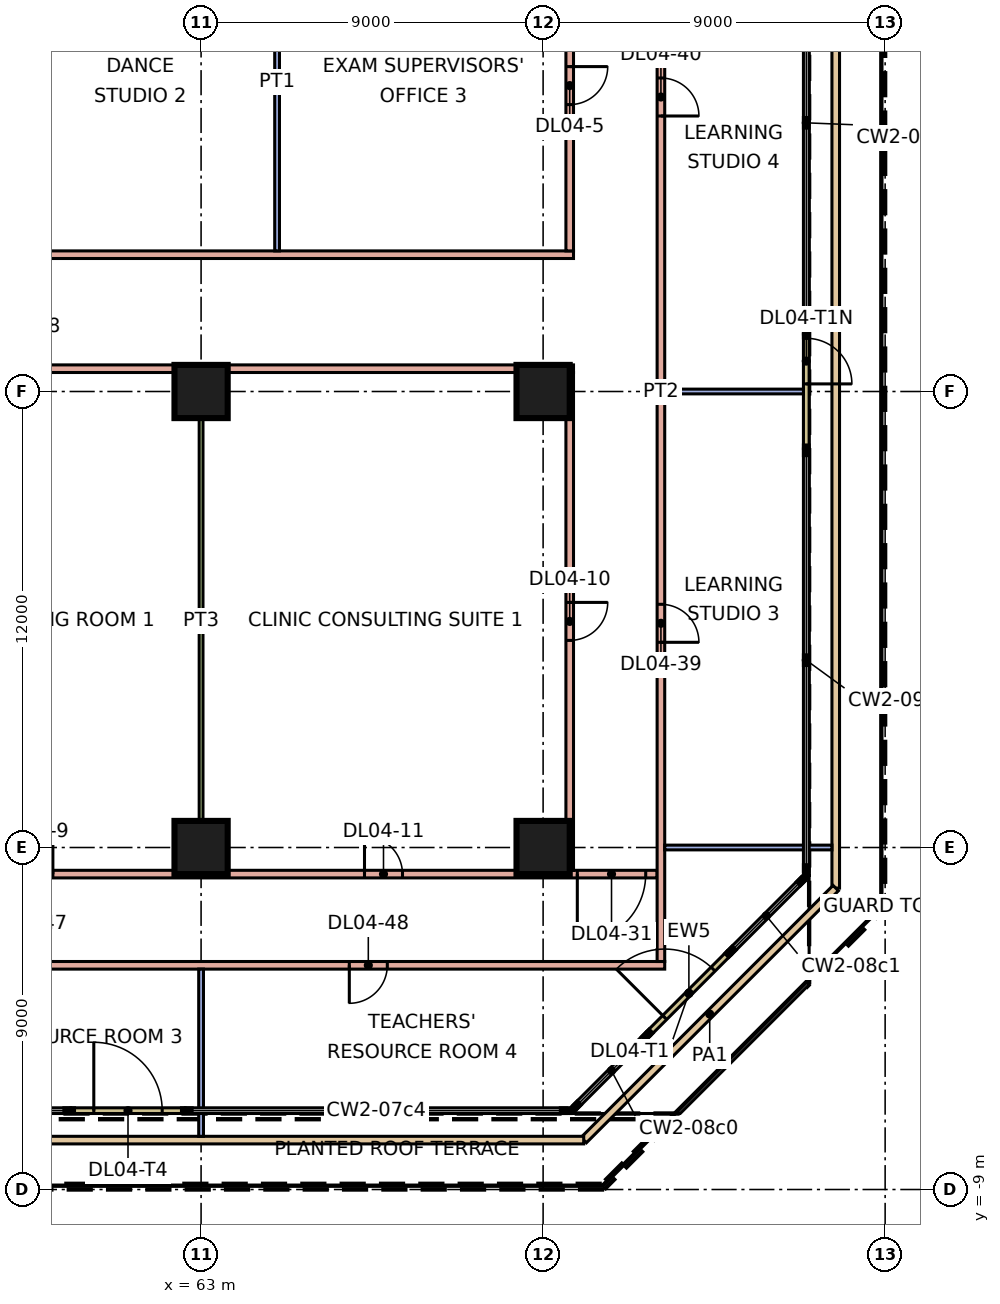
"""IFC4 building model, lengths in metres.
Left out: names, types, materials, properties, quantities, classifications, styles, units other than length and angle.
Written with IfcOpenShell. Run it as: python <this file> out.ifc"""

import sys

from ifc_helpers import new_model, si_unit, direction, frame, frame_2d, origin, origin_2d, place, context, subcontext, project, spatial, rectangle, extrude, element, fill, save


model = new_model("IFC4")
c1 = context("Model", 3, precision=1e-05, world=origin(), true_north=direction((0.0, 1.0)))
c2 = subcontext(c1, "Body", "Model", "MODEL_VIEW")
j1 = project(units=[si_unit("LENGTHUNIT", "METRE"), si_unit("PLANEANGLEUNIT", "RADIAN")], contexts=[c1])
p1 = place(None, origin())
s1 = spatial("IfcSite", under=j1, at=p1, CompositionType="ELEMENT")
p2 = place(p1, origin())
s2 = spatial("IfcBuilding", under=s1, at=p2, CompositionType="ELEMENT")
p3 = place(p2, frame((0.0, 0.0, 21.6)))
s3 = spatial("IfcBuildingStorey", under=s2, at=p3, CompositionType="ELEMENT", Elevation=21.6)
for number, where, z_axis, x_axis in (
    (1, (63.0, 0.0, 0.0), (0.0, 0.0, 1.0), (1.0, 0.0, 0.0)),
    (2, (72.0, 0.0, 0.0), (0.0, 0.0, 1.0), (1.0, 0.0, 0.0)),
    (3, (63.0, 12.0, 0.0), (0.0, 0.0, 1.0), (1.0, 0.0, 0.0)),
    (4, (72.0, 12.0, 0.0), (0.0, 0.0, 1.0), (1.0, 0.0, 0.0)),
):
    element("IfcColumn", number, at=place(p3, frame(where, z_axis=z_axis, x_axis=x_axis)), inside=s3, PredefinedType="COLUMN", context=c2, shape_type="SweptSolid", body=[
        extrude(rectangle(XDim=1.4, YDim=1.4, at=origin_2d()), origin(), (0.0, 0.0, 1.0), 4.8),
    ])
p4 = place(p3, frame((59.577, -6.925, 0.0), z_axis=(0.0, 0.0, 1.0), x_axis=(1.0, 0.0, 0.0)))
e5 = element("IfcWall", 5, at=p4, inside=s3, PredefinedType="SOLIDWALL", context=c2, shape_type="SweptSolid", body=[
    extrude(rectangle(XDim=3.0, YDim=0.15, at=frame_2d((1.5, 0.0))), origin(), (0.0, 0.0, 1.0), 4.4),
])
p5 = place(p4, frame((0.6, 0.0, 0.0)))
e6 = element("IfcOpeningElement", 6, at=p5, cuts=e5, PredefinedType="OPENING", context=c2, shape_type="SweptSolid", body=[
    extrude(rectangle(XDim=1.8, YDim=2.4, at=frame_2d((0.9, 1.2))), frame((0.0, 0.085, 0.0), z_axis=(0.0, -1.0, 0.0), x_axis=(1.0, 0.0, 0.0)), (0.0, 0.0, 1.0), 0.17),
])
p6 = place(p3, frame((74.775, -4.897, 0.0), z_axis=(0.0, 0.0, 1.0), x_axis=(0.707106781187, 0.707106781187, 0.0)))
e7 = element("IfcWall", 7, at=p6, inside=s3, PredefinedType="SOLIDWALL", context=c2, shape_type="SweptSolid", body=[
    extrude(rectangle(XDim=3.0, YDim=0.15, at=frame_2d((1.5, 0.0))), origin(), (0.0, 0.0, 1.0), 4.4),
])
p7 = place(p6, frame((0.6, 0.0, 0.0)))
e8 = element("IfcOpeningElement", 8, at=p7, cuts=e7, PredefinedType="OPENING", context=c2, shape_type="SweptSolid", body=[
    extrude(rectangle(XDim=1.8, YDim=2.4, at=frame_2d((0.9, 1.2))), frame((0.0, 0.085, 0.0), z_axis=(0.0, -1.0, 0.0), x_axis=(1.0, 0.0, 0.0)), (0.0, 0.0, 1.0), 0.17),
])
p8 = place(p3, frame((78.925, 10.5, 0.0), z_axis=(0.0, 0.0, 1.0), x_axis=(0.0, 1.0, 0.0)))
e9 = element("IfcWall", 9, at=p8, inside=s3, PredefinedType="SOLIDWALL", context=c2, shape_type="SweptSolid", body=[
    extrude(rectangle(XDim=3.0, YDim=0.15, at=frame_2d((1.5, 0.0))), origin(), (0.0, 0.0, 1.0), 4.4),
])
p9 = place(p8, frame((1.7, 0.0, 0.0)))
e10 = element("IfcOpeningElement", 10, at=p9, cuts=e9, PredefinedType="OPENING", context=c2, shape_type="SweptSolid", body=[
    extrude(rectangle(XDim=1.2, YDim=2.4, at=frame_2d((0.6, 1.2))), frame((0.0, 0.085, 0.0), z_axis=(0.0, -1.0, 0.0), x_axis=(1.0, 0.0, 0.0)), (0.0, 0.0, 1.0), 0.17),
])
p10 = place(p3, frame((79.7, 25.068, 0.0), z_axis=(0.0, 0.0, 1.0), x_axis=(0.0, -1.0, 0.0)))
e11 = element("IfcWall", 11, at=p10, inside=s3, PredefinedType="PARAPET", context=c2, shape_type="SweptSolid", body=[
    extrude(rectangle(XDim=26.136, YDim=0.2, at=frame_2d((13.068, 0.0))), origin(), (0.0, 0.0, 1.0), 0.5),
])
p11 = place(p3, frame((79.7, -1.068, 0.0), z_axis=(0.0, 0.0, 1.0), x_axis=(-0.707106781187, -0.707106781187, 0.0)))
e12 = element("IfcWall", 12, at=p11, inside=s3, PredefinedType="PARAPET", context=c2, shape_type="SweptSolid", body=[
    extrude(rectangle(XDim=9.379, YDim=0.2, at=frame_2d((4.689, 0.0))), origin(), (0.0, 0.0, 1.0), 0.5),
])
p12 = place(p3, frame((73.068, -7.7, 0.0), z_axis=(0.0, 0.0, 1.0), x_axis=(-1.0, 0.0, 0.0)))
e13 = element("IfcWall", 13, at=p12, inside=s3, PredefinedType="PARAPET", context=c2, shape_type="SweptSolid", body=[
    extrude(rectangle(XDim=63.136, YDim=0.2, at=frame_2d((31.568, 0.0))), origin(), (0.0, 0.0, 1.0), 0.5),
])
p13 = place(p3, frame((5.473, -3.1, 0.0), z_axis=(0.0, 0.0, 1.0), x_axis=(1.0, 0.0, 0.0)))
e14 = element("IfcWall", 14, at=p13, inside=s3, PredefinedType="PARTITIONING", context=c2, shape_type="SweptSolid", body=[
    extrude(rectangle(XDim=69.727, YDim=0.2, at=frame_2d((34.863, 0.0))), origin(), (0.0, 0.0, 1.0), 4.4),
])
p14 = place(p13, frame((11.927, 0.0, 0.0)))
e15 = element("IfcOpeningElement", 15, at=p14, cuts=e14, PredefinedType="OPENING", context=c2, shape_type="SweptSolid", body=[
    extrude(rectangle(XDim=1.0, YDim=2.1, at=frame_2d((0.5, 1.05))), frame((0.0, 0.11, 0.0), z_axis=(0.0, -1.0, 0.0), x_axis=(1.0, 0.0, 0.0)), (0.0, 0.0, 1.0), 0.22),
])
p15 = place(p13, frame((23.927, 0.0, 0.0)))
e16 = element("IfcOpeningElement", 16, at=p15, cuts=e14, PredefinedType="OPENING", context=c2, shape_type="SweptSolid", body=[
    extrude(rectangle(XDim=1.0, YDim=2.1, at=frame_2d((0.5, 1.05))), frame((0.0, 0.11, 0.0), z_axis=(0.0, -1.0, 0.0), x_axis=(1.0, 0.0, 0.0)), (0.0, 0.0, 1.0), 0.22),
])
p16 = place(p13, frame((34.427, 0.0, 0.0)))
e17 = element("IfcOpeningElement", 17, at=p16, cuts=e14, PredefinedType="OPENING", context=c2, shape_type="SweptSolid", body=[
    extrude(rectangle(XDim=1.0, YDim=2.1, at=frame_2d((0.5, 1.05))), frame((0.0, 0.11, 0.0), z_axis=(0.0, -1.0, 0.0), x_axis=(1.0, 0.0, 0.0)), (0.0, 0.0, 1.0), 0.22),
])
p17 = place(p13, frame((43.427, 0.0, 0.0)))
e18 = element("IfcOpeningElement", 18, at=p17, cuts=e14, PredefinedType="OPENING", context=c2, shape_type="SweptSolid", body=[
    extrude(rectangle(XDim=1.0, YDim=2.1, at=frame_2d((0.5, 1.05))), frame((0.0, 0.11, 0.0), z_axis=(0.0, -1.0, 0.0), x_axis=(1.0, 0.0, 0.0)), (0.0, 0.0, 1.0), 0.22),
])
p18 = place(p13, frame((52.427, 0.0, 0.0)))
e19 = element("IfcOpeningElement", 19, at=p18, cuts=e14, PredefinedType="OPENING", context=c2, shape_type="SweptSolid", body=[
    extrude(rectangle(XDim=1.0, YDim=2.1, at=frame_2d((0.5, 1.05))), frame((0.0, 0.11, 0.0), z_axis=(0.0, -1.0, 0.0), x_axis=(1.0, 0.0, 0.0)), (0.0, 0.0, 1.0), 0.22),
])
p19 = place(p13, frame((61.427, 0.0, 0.0)))
e20 = element("IfcOpeningElement", 20, at=p19, cuts=e14, PredefinedType="OPENING", context=c2, shape_type="SweptSolid", body=[
    extrude(rectangle(XDim=1.0, YDim=2.1, at=frame_2d((0.5, 1.05))), frame((0.0, 0.11, 0.0), z_axis=(0.0, -1.0, 0.0), x_axis=(1.0, 0.0, 0.0)), (0.0, 0.0, 1.0), 0.22),
])
p20 = place(p3, frame((51.225, 15.6, 0.0), z_axis=(0.0, 0.0, 1.0), x_axis=(1.0, 0.0, 0.0)))
e21 = element("IfcWall", 21, at=p20, inside=s3, PredefinedType="PARTITIONING", context=c2, shape_type="SweptSolid", body=[
    extrude(rectangle(XDim=21.575, YDim=0.2, at=frame_2d((10.788, 0.0))), origin(), (0.0, 0.0, 1.0), 4.4),
])
p21 = place(p3, frame((54.0, -0.7, 0.0), z_axis=(0.0, 0.0, 1.0), x_axis=(1.0, 0.0, 0.0)))
e22 = element("IfcWall", 22, at=p21, inside=s3, PredefinedType="PARTITIONING", context=c2, shape_type="SweptSolid", body=[
    extrude(rectangle(XDim=21.0, YDim=0.2, at=frame_2d((10.5, 0.0))), origin(), (0.0, 0.0, 1.0), 4.4),
])
p22 = place(p21, frame((4.1, 0.0, 0.0)))
e23 = element("IfcOpeningElement", 23, at=p22, cuts=e22, PredefinedType="OPENING", context=c2, shape_type="SweptSolid", body=[
    extrude(rectangle(XDim=1.0, YDim=2.1, at=frame_2d((0.5, 1.05))), frame((0.0, 0.11, 0.0), z_axis=(0.0, -1.0, 0.0), x_axis=(1.0, 0.0, 0.0)), (0.0, 0.0, 1.0), 0.22),
])
p23 = place(p21, frame((13.3, 0.0, 0.0)))
e24 = element("IfcOpeningElement", 24, at=p23, cuts=e22, PredefinedType="OPENING", context=c2, shape_type="SweptSolid", body=[
    extrude(rectangle(XDim=1.0, YDim=2.1, at=frame_2d((0.5, 1.05))), frame((0.0, 0.11, 0.0), z_axis=(0.0, -1.0, 0.0), x_axis=(1.0, 0.0, 0.0)), (0.0, 0.0, 1.0), 0.22),
])
p24 = place(p21, frame((18.9, 0.0, 0.0)))
e25 = element("IfcOpeningElement", 25, at=p24, cuts=e22, PredefinedType="OPENING", context=c2, shape_type="SweptSolid", body=[
    extrude(rectangle(XDim=1.8, YDim=2.1, at=frame_2d((0.9, 1.05))), frame((0.0, 0.11, 0.0), z_axis=(0.0, -1.0, 0.0), x_axis=(1.0, 0.0, 0.0)), (0.0, 0.0, 1.0), 0.22),
])
p25 = place(p3, frame((54.0, 12.6, 0.0), z_axis=(0.0, 0.0, 1.0), x_axis=(1.0, 0.0, 0.0)))
e26 = element("IfcWall", 26, at=p25, inside=s3, PredefinedType="PARTITIONING", context=c2, shape_type="SweptSolid", body=[
    extrude(rectangle(XDim=18.8, YDim=0.2, at=frame_2d((9.4, 0.0))), origin(), (0.0, 0.0, 1.0), 4.4),
])
p26 = place(p25, frame((3.9, 0.0, 0.0)))
e27 = element("IfcOpeningElement", 27, at=p26, cuts=e26, PredefinedType="OPENING", context=c2, shape_type="SweptSolid", body=[
    extrude(rectangle(XDim=1.0, YDim=2.1, at=frame_2d((0.5, 1.05))), frame((0.0, 0.11, 0.0), z_axis=(0.0, -1.0, 0.0), x_axis=(1.0, 0.0, 0.0)), (0.0, 0.0, 1.0), 0.22),
])
p27 = place(p3, frame((63.0, -7.6, 0.0), z_axis=(0.0, 0.0, 1.0), x_axis=(0.0, 1.0, 0.0)))
e28 = element("IfcWall", 28, at=p27, inside=s3, PredefinedType="PARTITIONING", context=c2, shape_type="SweptSolid", body=[
    extrude(rectangle(XDim=4.4, YDim=0.125, at=frame_2d((2.2, 0.0))), origin(), (0.0, 0.0, 1.0), 4.4),
])
p28 = place(p3, frame((63.0, -0.6, 0.0), z_axis=(0.0, 0.0, 1.0), x_axis=(0.0, 1.0, 0.0)))
e29 = element("IfcWall", 29, at=p28, inside=s3, PredefinedType="PARTITIONING", context=c2, shape_type="SweptSolid", body=[
    extrude(rectangle(XDim=13.1, YDim=0.1, at=frame_2d((6.55, 0.0))), origin(), (0.0, 0.0, 1.0), 4.4),
])
p29 = place(p3, frame((65.0, 15.7, 0.0), z_axis=(0.0, 0.0, 1.0), x_axis=(0.0, 1.0, 0.0)))
e30 = element("IfcWall", 30, at=p29, inside=s3, PredefinedType="PARTITIONING", context=c2, shape_type="SweptSolid", body=[
    extrude(rectangle(XDim=8.9, YDim=0.125, at=frame_2d((4.45, 0.0))), origin(), (0.0, 0.0, 1.0), 4.4),
])
p30 = place(p3, frame((72.7, -0.6, 0.0), z_axis=(0.0, 0.0, 1.0), x_axis=(0.0, 1.0, 0.0)))
e31 = element("IfcWall", 31, at=p30, inside=s3, PredefinedType="PARTITIONING", context=c2, shape_type="SweptSolid", body=[
    extrude(rectangle(XDim=13.1, YDim=0.2, at=frame_2d((6.55, 0.0))), origin(), (0.0, 0.0, 1.0), 4.4),
])
p31 = place(p30, frame((6.05, 0.0, 0.0)))
e32 = element("IfcOpeningElement", 32, at=p31, cuts=e31, PredefinedType="OPENING", context=c2, shape_type="SweptSolid", body=[
    extrude(rectangle(XDim=1.0, YDim=2.1, at=frame_2d((0.5, 1.05))), frame((0.0, 0.11, 0.0), z_axis=(0.0, -1.0, 0.0), x_axis=(1.0, 0.0, 0.0)), (0.0, 0.0, 1.0), 0.22),
])
p32 = place(p3, frame((72.7, 15.7, 0.0), z_axis=(0.0, 0.0, 1.0), x_axis=(0.0, 1.0, 0.0)))
e33 = element("IfcWall", 33, at=p32, inside=s3, PredefinedType="PARTITIONING", context=c2, shape_type="SweptSolid", body=[
    extrude(rectangle(XDim=8.9, YDim=0.2, at=frame_2d((4.45, 0.0))), origin(), (0.0, 0.0, 1.0), 4.4),
])
p33 = place(p32, frame((3.85, 0.0, 0.0)))
e34 = element("IfcOpeningElement", 34, at=p33, cuts=e33, PredefinedType="OPENING", context=c2, shape_type="SweptSolid", body=[
    extrude(rectangle(XDim=1.0, YDim=2.1, at=frame_2d((0.5, 1.05))), frame((0.0, 0.11, 0.0), z_axis=(0.0, -1.0, 0.0), x_axis=(1.0, 0.0, 0.0)), (0.0, 0.0, 1.0), 0.22),
])
p34 = place(p3, frame((75.1, -3.0, 0.0), z_axis=(0.0, 0.0, 1.0), x_axis=(0.0, 1.0, 0.0)))
e35 = element("IfcWall", 35, at=p34, inside=s3, PredefinedType="PARTITIONING", context=c2, shape_type="SweptSolid", body=[
    extrude(rectangle(XDim=30.0, YDim=0.2, at=frame_2d((15.0, 0.0))), origin(), (0.0, 0.0, 1.0), 4.4),
])
p35 = place(p34, frame((8.4, 0.0, 0.0)))
e36 = element("IfcOpeningElement", 36, at=p35, cuts=e35, PredefinedType="OPENING", context=c2, shape_type="SweptSolid", body=[
    extrude(rectangle(XDim=1.0, YDim=2.1, at=frame_2d((0.5, 1.05))), frame((0.0, 0.11, 0.0), z_axis=(0.0, -1.0, 0.0), x_axis=(1.0, 0.0, 0.0)), (0.0, 0.0, 1.0), 0.22),
])
p36 = place(p34, frame((22.25, 0.0, 0.0)))
e37 = element("IfcOpeningElement", 37, at=p36, cuts=e35, PredefinedType="OPENING", context=c2, shape_type="SweptSolid", body=[
    extrude(rectangle(XDim=1.0, YDim=2.1, at=frame_2d((0.5, 1.05))), frame((0.0, 0.11, 0.0), z_axis=(0.0, -1.0, 0.0), x_axis=(1.0, 0.0, 0.0)), (0.0, 0.0, 1.0), 0.22),
])
p37 = place(p3, frame((75.2, 0.0, 0.0), z_axis=(0.0, 0.0, 1.0), x_axis=(1.0, 0.0, 0.0)))
e38 = element("IfcWall", 38, at=p37, inside=s3, PredefinedType="PARTITIONING", context=c2, shape_type="SweptSolid", body=[
    extrude(rectangle(XDim=4.4, YDim=0.125, at=frame_2d((2.2, 0.0))), origin(), (0.0, 0.0, 1.0), 4.4),
])
p38 = place(p3, frame((75.2, 12.0, 0.0), z_axis=(0.0, 0.0, 1.0), x_axis=(1.0, 0.0, 0.0)))
e39 = element("IfcWall", 39, at=p38, inside=s3, PredefinedType="PARTITIONING", context=c2, shape_type="SweptSolid", body=[
    extrude(rectangle(XDim=3.651, YDim=0.125, at=frame_2d((1.826, 0.0))), origin(), (0.0, 0.0, 1.0), 4.4),
])
p39 = place(p5, origin())
e40 = element("IfcDoor", 40, at=p39, inside=s3, OperationType="DOUBLE_DOOR_SINGLE_SWING", PredefinedType="DOOR", context=c2, shape_type="SweptSolid", body=[
    extrude(rectangle(XDim=1.8, YDim=2.4, at=frame_2d((0.9, 1.2))), frame((0.0, 0.025, 0.0), z_axis=(0.0, -1.0, 0.0), x_axis=(1.0, 0.0, 0.0)), (0.0, 0.0, 1.0), 0.05),
])
fill(e6, e40)
p40 = place(p7, origin())
e41 = element("IfcDoor", 41, at=p40, inside=s3, OperationType="DOUBLE_DOOR_SINGLE_SWING", PredefinedType="DOOR", context=c2, shape_type="SweptSolid", body=[
    extrude(rectangle(XDim=1.8, YDim=2.4, at=frame_2d((0.9, 1.2))), frame((0.0, 0.025, 0.0), z_axis=(0.0, -1.0, 0.0), x_axis=(1.0, 0.0, 0.0)), (0.0, 0.0, 1.0), 0.05),
])
fill(e8, e41)
p41 = place(p9, frame((1.2, 0.0, 0.0), z_axis=(0.0, 0.0, 1.0), x_axis=(-1.0, 0.0, 0.0)))
e42 = element("IfcDoor", 42, at=p41, inside=s3, OperationType="DOUBLE_DOOR_SINGLE_SWING", PredefinedType="DOOR", context=c2, shape_type="SweptSolid", body=[
    extrude(rectangle(XDim=1.2, YDim=2.4, at=frame_2d((0.6, 1.2))), frame((0.0, 0.025, 0.0), z_axis=(0.0, -1.0, 0.0), x_axis=(1.0, 0.0, 0.0)), (0.0, 0.0, 1.0), 0.05),
])
fill(e10, e42)
p42 = place(p33, origin())
e43 = element("IfcDoor", 43, at=p42, inside=s3, OperationType="SINGLE_SWING_RIGHT", PredefinedType="DOOR", context=c2, shape_type="SweptSolid", body=[
    extrude(rectangle(XDim=1.0, YDim=2.1, at=frame_2d((0.5, 1.05))), frame((0.0, 0.025, 0.0), z_axis=(0.0, -1.0, 0.0), x_axis=(1.0, 0.0, 0.0)), (0.0, 0.0, 1.0), 0.05),
])
fill(e34, e43)
p43 = place(p22, frame((1.0, 0.0, 0.0), z_axis=(0.0, 0.0, 1.0), x_axis=(-1.0, 0.0, 0.0)))
e44 = element("IfcDoor", 44, at=p43, inside=s3, OperationType="SINGLE_SWING_RIGHT", PredefinedType="DOOR", context=c2, shape_type="SweptSolid", body=[
    extrude(rectangle(XDim=1.0, YDim=2.1, at=frame_2d((0.5, 1.05))), frame((0.0, 0.025, 0.0), z_axis=(0.0, -1.0, 0.0), x_axis=(1.0, 0.0, 0.0)), (0.0, 0.0, 1.0), 0.05),
])
fill(e23, e44)
p44 = place(p31, origin())
e45 = element("IfcDoor", 45, at=p44, inside=s3, OperationType="SINGLE_SWING_RIGHT", PredefinedType="DOOR", context=c2, shape_type="SweptSolid", body=[
    extrude(rectangle(XDim=1.0, YDim=2.1, at=frame_2d((0.5, 1.05))), frame((0.0, 0.025, 0.0), z_axis=(0.0, -1.0, 0.0), x_axis=(1.0, 0.0, 0.0)), (0.0, 0.0, 1.0), 0.05),
])
fill(e32, e45)
p45 = place(p23, origin())
e46 = element("IfcDoor", 46, at=p45, inside=s3, OperationType="SINGLE_SWING_LEFT", PredefinedType="DOOR", context=c2, shape_type="SweptSolid", body=[
    extrude(rectangle(XDim=1.0, YDim=2.1, at=frame_2d((0.5, 1.05))), frame((0.0, 0.025, 0.0), z_axis=(0.0, -1.0, 0.0), x_axis=(1.0, 0.0, 0.0)), (0.0, 0.0, 1.0), 0.05),
])
fill(e24, e46)
p46 = place(p24, frame((1.8, 0.0, 0.0), z_axis=(0.0, 0.0, 1.0), x_axis=(-1.0, 0.0, 0.0)))
e47 = element("IfcDoor", 47, at=p46, inside=s3, OperationType="DOUBLE_DOOR_SINGLE_SWING", PredefinedType="DOOR", context=c2, shape_type="SweptSolid", body=[
    extrude(rectangle(XDim=1.8, YDim=2.1, at=frame_2d((0.9, 1.05))), frame((0.0, 0.025, 0.0), z_axis=(0.0, -1.0, 0.0), x_axis=(1.0, 0.0, 0.0)), (0.0, 0.0, 1.0), 0.05),
])
fill(e25, e47)
p47 = place(p35, frame((1.0, 0.0, 0.0), z_axis=(0.0, 0.0, 1.0), x_axis=(-1.0, 0.0, 0.0)))
e48 = element("IfcDoor", 48, at=p47, inside=s3, OperationType="SINGLE_SWING_LEFT", PredefinedType="DOOR", context=c2, shape_type="SweptSolid", body=[
    extrude(rectangle(XDim=1.0, YDim=2.1, at=frame_2d((0.5, 1.05))), frame((0.0, 0.025, 0.0), z_axis=(0.0, -1.0, 0.0), x_axis=(1.0, 0.0, 0.0)), (0.0, 0.0, 1.0), 0.05),
])
fill(e36, e48)
p48 = place(p36, frame((1.0, 0.0, 0.0), z_axis=(0.0, 0.0, 1.0), x_axis=(-1.0, 0.0, 0.0)))
e49 = element("IfcDoor", 49, at=p48, inside=s3, OperationType="SINGLE_SWING_LEFT", PredefinedType="DOOR", context=c2, shape_type="SweptSolid", body=[
    extrude(rectangle(XDim=1.0, YDim=2.1, at=frame_2d((0.5, 1.05))), frame((0.0, 0.025, 0.0), z_axis=(0.0, -1.0, 0.0), x_axis=(1.0, 0.0, 0.0)), (0.0, 0.0, 1.0), 0.05),
])
fill(e37, e49)
p49 = place(p19, frame((1.0, 0.0, 0.0), z_axis=(0.0, 0.0, 1.0), x_axis=(-1.0, 0.0, 0.0)))
e50 = element("IfcDoor", 50, at=p49, inside=s3, OperationType="SINGLE_SWING_LEFT", PredefinedType="DOOR", context=c2, shape_type="SweptSolid", body=[
    extrude(rectangle(XDim=1.0, YDim=2.1, at=frame_2d((0.5, 1.05))), frame((0.0, 0.025, 0.0), z_axis=(0.0, -1.0, 0.0), x_axis=(1.0, 0.0, 0.0)), (0.0, 0.0, 1.0), 0.05),
])
fill(e20, e50)
save(model, sys.argv[1])
